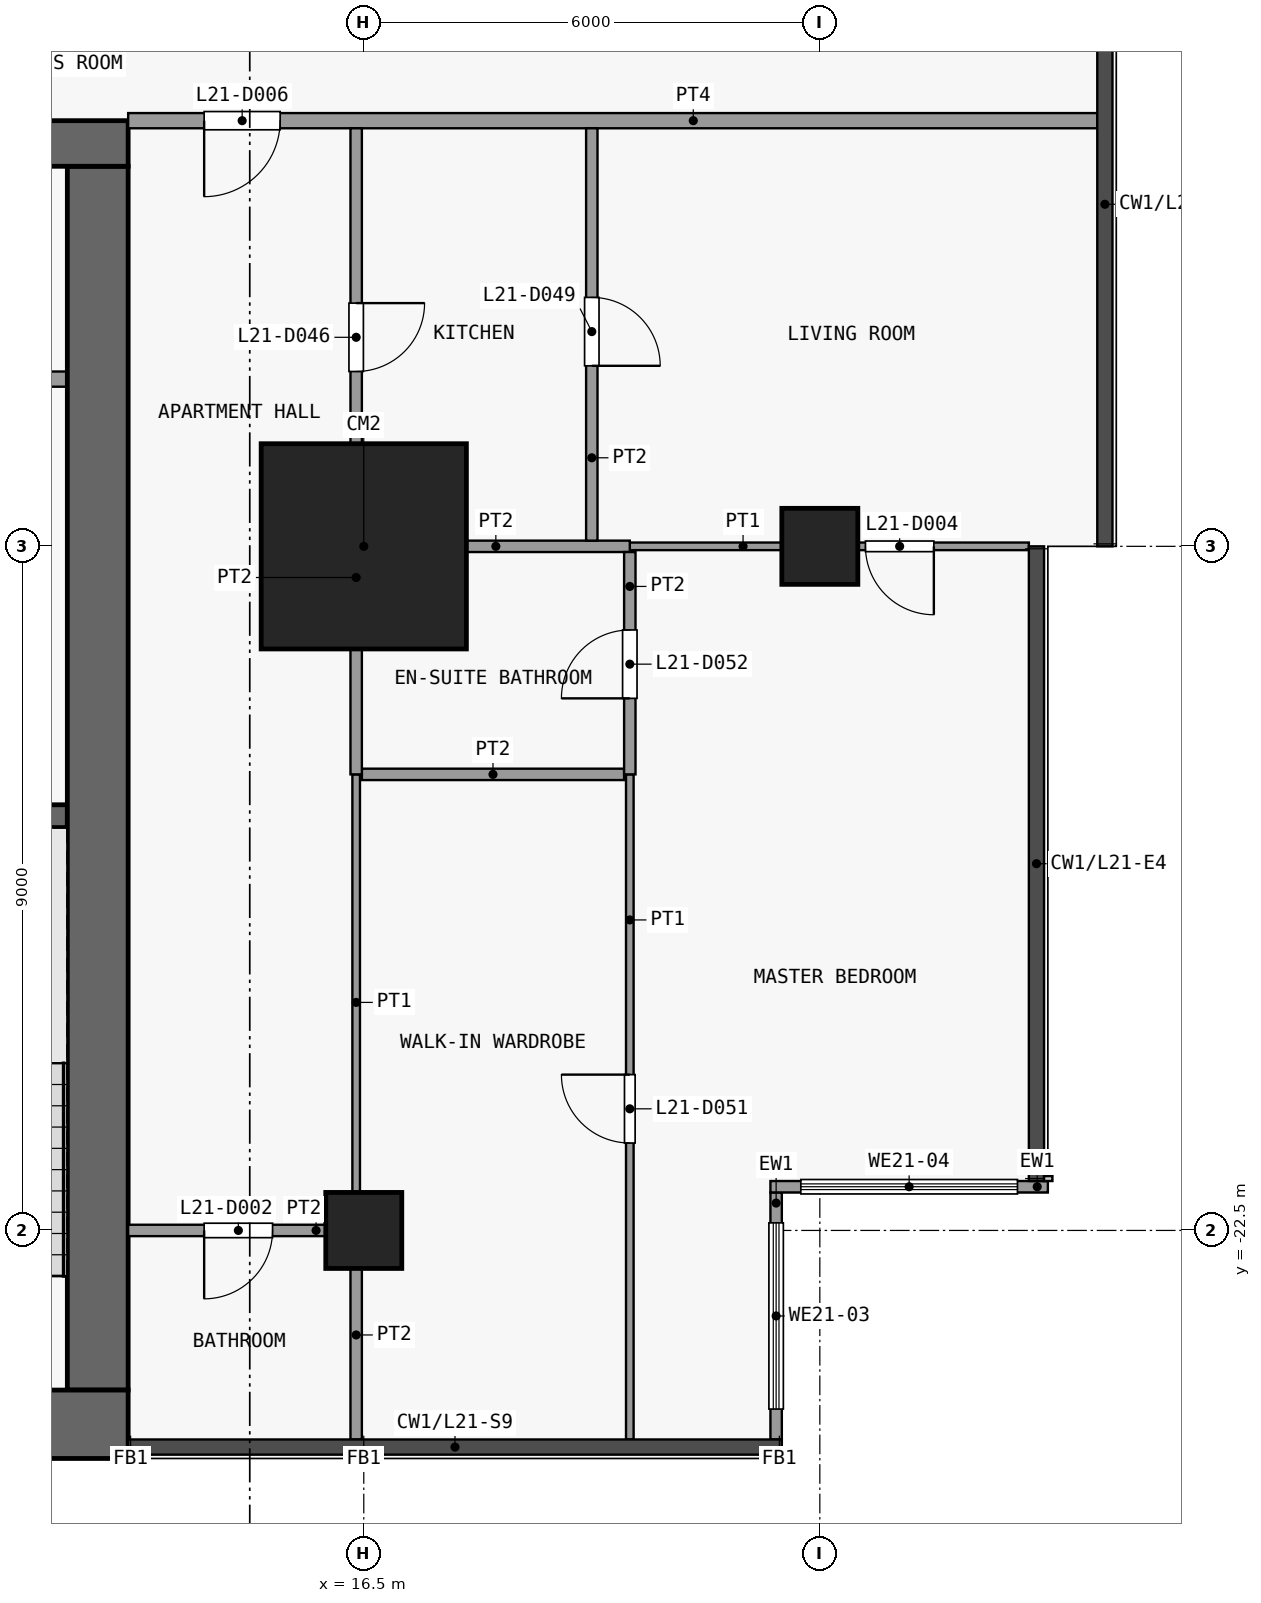
"""IFC4 building model, lengths in metres.
Left out: names, types, materials, properties, quantities, classifications, styles, units other than length and angle.
Written with IfcOpenShell. Run it as: python <this file> out.ifc"""

import sys

from ifc_helpers import new_model, si_unit, direction, frame, frame_2d, origin, origin_2d, place, context, subcontext, project, spatial, rectangle, extrude, element, fill, save


model = new_model("IFC4")
c1 = context("Model", 3, precision=1e-05, world=origin(), true_north=direction((0.0, 1.0)))
c2 = subcontext(c1, "Body", "Model", "MODEL_VIEW")
j1 = project(units=[si_unit("LENGTHUNIT", "METRE"), si_unit("PLANEANGLEUNIT", "RADIAN")], contexts=[c1])
p1 = place(None, origin())
s1 = spatial("IfcSite", under=j1, at=p1, CompositionType="ELEMENT")
p2 = place(p1, origin())
s2 = spatial("IfcBuilding", under=s1, at=p2, CompositionType="ELEMENT")
p3 = place(p2, frame((0.0, 0.0, 88.3)))
s3 = spatial("IfcBuildingStorey", under=s2, at=p3, CompositionType="ELEMENT", Elevation=88.3)
p4 = place(p3, frame((16.5, -22.5, 0.0), z_axis=(0.0, 0.0, 1.0), x_axis=(1.0, 0.0, 0.0)))
e1 = element("IfcColumn", 1, at=p4, inside=s3, PredefinedType="COLUMN", context=c2, shape_type="SweptSolid", body=[
    extrude(rectangle(XDim=1.0, YDim=1.0, at=origin_2d()), origin(), (0.0, 0.0, 1.0), 3.6),
])
p5 = place(p3, frame((16.5, -13.5, 0.0), z_axis=(0.0, 0.0, 1.0), x_axis=(1.0, 0.0, 0.0)))
e2 = element("IfcColumn", 2, at=p5, inside=s3, PredefinedType="COLUMN", context=c2, shape_type="SweptSolid", body=[
    extrude(rectangle(XDim=2.7, YDim=2.7, at=origin_2d()), origin(), (0.0, 0.0, 1.0), 3.6),
])
p6 = place(p3, frame((22.5, -13.5, 0.0), z_axis=(0.0, 0.0, 1.0), x_axis=(1.0, 0.0, 0.0)))
e3 = element("IfcColumn", 3, at=p6, inside=s3, PredefinedType="COLUMN", context=c2, shape_type="SweptSolid", body=[
    extrude(rectangle(XDim=1.0, YDim=1.0, at=origin_2d()), origin(), (0.0, 0.0, 1.0), 3.6),
])
p7 = place(p3, frame((-13.4, -25.05, 0.0), z_axis=(0.0, 0.0, 1.0), x_axis=(1.0, 0.0, 0.0)))
e4 = element("IfcWall", 4, at=p7, inside=s3, PredefinedType="SHEAR", context=c2, shape_type="SweptSolid", body=[
    extrude(rectangle(XDim=26.8, YDim=0.9, at=frame_2d((13.4, 0.0))), origin(), (0.0, 0.0, 1.0), 3.3),
])
p8 = place(p3, frame((-13.4, -8.2, 0.0), z_axis=(0.0, 0.0, 1.0), x_axis=(1.0, 0.0, 0.0)))
e5 = element("IfcWall", 5, at=p8, inside=s3, PredefinedType="SHEAR", context=c2, shape_type="SweptSolid", body=[
    extrude(rectangle(XDim=26.8, YDim=0.6, at=frame_2d((13.4, 0.0))), origin(), (0.0, 0.0, 1.0), 3.3),
])
p9 = place(p8, frame((7.7, 0.0, 0.0)))
e6 = element("IfcOpeningElement", 6, at=p9, cuts=e5, PredefinedType="OPENING", context=c2, shape_type="SweptSolid", body=[
    extrude(rectangle(XDim=1.8, YDim=2.1, at=frame_2d((0.9, 1.05))), frame((0.0, 0.31, 0.0), z_axis=(0.0, -1.0, 0.0), x_axis=(1.0, 0.0, 0.0)), (0.0, 0.0, 1.0), 0.62),
])
p10 = place(p8, frame((17.3, 0.0, 0.0)))
e7 = element("IfcOpeningElement", 7, at=p10, cuts=e5, PredefinedType="OPENING", context=c2, shape_type="SweptSolid", body=[
    extrude(rectangle(XDim=1.8, YDim=2.1, at=frame_2d((0.9, 1.05))), frame((0.0, 0.31, 0.0), z_axis=(0.0, -1.0, 0.0), x_axis=(1.0, 0.0, 0.0)), (0.0, 0.0, 1.0), 0.62),
])
p11 = place(p8, frame((2.625, 0.0, 0.0)))
e8 = element("IfcOpeningElement", 8, at=p11, cuts=e5, PredefinedType="OPENING", context=c2, shape_type="SweptSolid", body=[
    extrude(rectangle(XDim=0.9, YDim=2.1, at=frame_2d((0.45, 1.05))), frame((0.0, 0.31, 0.0), z_axis=(0.0, -1.0, 0.0), x_axis=(1.0, 0.0, 0.0)), (0.0, 0.0, 1.0), 0.62),
])
p12 = place(p8, frame((23.275, 0.0, 0.0)))
e9 = element("IfcOpeningElement", 9, at=p12, cuts=e5, PredefinedType="OPENING", context=c2, shape_type="SweptSolid", body=[
    extrude(rectangle(XDim=0.9, YDim=2.1, at=frame_2d((0.45, 1.05))), frame((0.0, 0.31, 0.0), z_axis=(0.0, -1.0, 0.0), x_axis=(1.0, 0.0, 0.0)), (0.0, 0.0, 1.0), 0.62),
])
p13 = place(p3, frame((13.0, -24.6, 0.0), z_axis=(0.0, 0.0, 1.0), x_axis=(0.0, 1.0, 0.0)))
e10 = element("IfcWall", 10, at=p13, inside=s3, PredefinedType="SHEAR", context=c2, shape_type="SweptSolid", body=[
    extrude(rectangle(XDim=16.1, YDim=0.8, at=frame_2d((8.05, 0.0))), origin(), (0.0, 0.0, 1.0), 3.3),
])
p14 = place(p3, frame((9.5, -17.05, 0.0), z_axis=(0.0, 0.0, 1.0), x_axis=(1.0, 0.0, 0.0)))
e11 = element("IfcWall", 11, at=p14, inside=s3, PredefinedType="SHEAR", context=c2, shape_type="SweptSolid", body=[
    extrude(rectangle(XDim=3.1, YDim=0.3, at=frame_2d((1.55, 0.0))), origin(), (0.0, 0.0, 1.0), 3.3),
])
p15 = place(p3, frame((11.15, -11.3, 0.0), z_axis=(0.0, 0.0, 1.0), x_axis=(1.0, 0.0, 0.0)))
e12 = element("IfcWall", 12, at=p15, inside=s3, PredefinedType="PARTITIONING", context=c2, shape_type="SweptSolid", body=[
    extrude(rectangle(XDim=1.45, YDim=0.2, at=frame_2d((0.725, 0.0))), origin(), (0.0, 0.0, 1.0), 3.3),
])
p16 = place(p3, frame((21.925, -22.0, 0.0), z_axis=(0.0, 0.0, 1.0), x_axis=(0.0, -1.0, 0.0)))
e13 = element("IfcWall", 13, at=p16, inside=s3, PredefinedType="SOLIDWALL", context=c2, shape_type="SweptSolid", body=[
    extrude(rectangle(XDim=3.25, YDim=0.15, at=frame_2d((1.625, 0.0))), origin(), (0.0, 0.0, 1.0), 3.3),
])
p17 = place(p16, frame((0.4, 0.0, 0.9)))
e14 = element("IfcOpeningElement", 14, at=p17, cuts=e13, PredefinedType="OPENING", context=c2, shape_type="SweptSolid", body=[
    extrude(rectangle(XDim=2.45, YDim=2.4, at=frame_2d((1.225, 1.2))), frame((0.0, 0.085, 0.0), z_axis=(0.0, -1.0, 0.0), x_axis=(1.0, 0.0, 0.0)), (0.0, 0.0, 1.0), 0.17),
])
p18 = place(p3, frame((25.5, -21.925, 0.0), z_axis=(0.0, 0.0, 1.0), x_axis=(-1.0, 0.0, 0.0)))
e15 = element("IfcWall", 15, at=p18, inside=s3, PredefinedType="SOLIDWALL", context=c2, shape_type="SweptSolid", body=[
    extrude(rectangle(XDim=3.65, YDim=0.15, at=frame_2d((1.825, 0.0))), origin(), (0.0, 0.0, 1.0), 3.3),
])
p19 = place(p18, frame((0.4, 0.0, 0.9)))
e16 = element("IfcOpeningElement", 16, at=p19, cuts=e15, PredefinedType="OPENING", context=c2, shape_type="SweptSolid", body=[
    extrude(rectangle(XDim=2.85, YDim=2.4, at=frame_2d((1.425, 1.2))), frame((0.0, 0.085, 0.0), z_axis=(0.0, -1.0, 0.0), x_axis=(1.0, 0.0, 0.0)), (0.0, 0.0, 1.0), 0.17),
])
p20 = place(p3, frame((13.4, -22.5, 0.0), z_axis=(0.0, 0.0, 1.0), x_axis=(1.0, 0.0, 0.0)))
e17 = element("IfcWall", 17, at=p20, inside=s3, PredefinedType="PARTITIONING", context=c2, shape_type="SweptSolid", body=[
    extrude(rectangle(XDim=2.925, YDim=0.15, at=frame_2d((1.462, 0.0))), origin(), (0.0, 0.0, 1.0), 3.3),
])
p21 = place(p20, frame((1.0, 0.0, 0.0)))
e18 = element("IfcOpeningElement", 18, at=p21, cuts=e17, PredefinedType="OPENING", context=c2, shape_type="SweptSolid", body=[
    extrude(rectangle(XDim=0.9, YDim=2.1, at=frame_2d((0.45, 1.05))), frame((0.0, 0.085, 0.0), z_axis=(0.0, -1.0, 0.0), x_axis=(1.0, 0.0, 0.0)), (0.0, 0.0, 1.0), 0.17),
])
p22 = place(p3, frame((16.475, -16.5, 0.0), z_axis=(0.0, 0.0, 1.0), x_axis=(1.0, 0.0, 0.0)))
e19 = element("IfcWall", 19, at=p22, inside=s3, PredefinedType="PARTITIONING", context=c2, shape_type="SweptSolid", body=[
    extrude(rectangle(XDim=3.45, YDim=0.15, at=frame_2d((1.725, 0.0))), origin(), (0.0, 0.0, 1.0), 3.3),
])
p23 = place(p3, frame((20.0, -13.5, 0.0), z_axis=(0.0, 0.0, 1.0), x_axis=(1.0, 0.0, 0.0)))
e20 = element("IfcWall", 20, at=p23, inside=s3, PredefinedType="PARTITIONING", context=c2, shape_type="SweptSolid", body=[
    extrude(rectangle(XDim=5.25, YDim=0.1, at=frame_2d((2.625, 0.0))), origin(), (0.0, 0.0, 1.0), 3.3),
])
p24 = place(p23, frame((3.1, 0.0, 0.0)))
e21 = element("IfcOpeningElement", 21, at=p24, cuts=e20, PredefinedType="OPENING", context=c2, shape_type="SweptSolid", body=[
    extrude(rectangle(XDim=0.9, YDim=2.1, at=frame_2d((0.45, 1.05))), frame((0.0, 0.06, 0.0), z_axis=(0.0, -1.0, 0.0), x_axis=(1.0, 0.0, 0.0)), (0.0, 0.0, 1.0), 0.12),
])
p25 = place(p3, frame((16.475, -13.5, 0.0), z_axis=(0.0, 0.0, 1.0), x_axis=(1.0, 0.0, 0.0)))
e22 = element("IfcWall", 22, at=p25, inside=s3, PredefinedType="PARTITIONING", context=c2, shape_type="SweptSolid", body=[
    extrude(rectangle(XDim=3.525, YDim=0.15, at=frame_2d((1.762, 0.0))), origin(), (0.0, 0.0, 1.0), 3.3),
])
p26 = place(p3, frame((13.4, -7.9, 0.0), z_axis=(0.0, 0.0, 1.0), x_axis=(1.0, 0.0, 0.0)))
e23 = element("IfcWall", 23, at=p26, inside=s3, PredefinedType="PARTITIONING", context=c2, shape_type="SweptSolid", body=[
    extrude(rectangle(XDim=12.75, YDim=0.2, at=frame_2d((6.375, 0.0))), origin(), (0.0, 0.0, 1.0), 3.3),
])
p27 = place(p26, frame((1.0, 0.0, 0.0)))
e24 = element("IfcOpeningElement", 24, at=p27, cuts=e23, PredefinedType="OPENING", context=c2, shape_type="SweptSolid", body=[
    extrude(rectangle(XDim=1.0, YDim=2.1, at=frame_2d((0.5, 1.05))), frame((0.0, 0.11, 0.0), z_axis=(0.0, -1.0, 0.0), x_axis=(1.0, 0.0, 0.0)), (0.0, 0.0, 1.0), 0.22),
])
p28 = place(p3, frame((16.4, -22.5, 0.0), z_axis=(0.0, 0.0, 1.0), x_axis=(0.0, 1.0, 0.0)))
e25 = element("IfcWall", 25, at=p28, inside=s3, PredefinedType="PARTITIONING", context=c2, shape_type="SweptSolid", body=[
    extrude(rectangle(XDim=6.0, YDim=0.1, at=frame_2d((3.0, 0.0))), origin(), (0.0, 0.0, 1.0), 3.3),
])
p29 = place(p3, frame((16.4, -25.25, 0.0), z_axis=(0.0, 0.0, 1.0), x_axis=(0.0, 1.0, 0.0)))
e26 = element("IfcWall", 26, at=p29, inside=s3, PredefinedType="PARTITIONING", context=c2, shape_type="SweptSolid", body=[
    extrude(rectangle(XDim=2.75, YDim=0.15, at=frame_2d((1.375, 0.0))), origin(), (0.0, 0.0, 1.0), 3.3),
])
p30 = place(p3, frame((16.4, -16.5, 0.0), z_axis=(0.0, 0.0, 1.0), x_axis=(0.0, 1.0, 0.0)))
e27 = element("IfcWall", 27, at=p30, inside=s3, PredefinedType="PARTITIONING", context=c2, shape_type="SweptSolid", body=[
    extrude(rectangle(XDim=8.5, YDim=0.15, at=frame_2d((4.25, 0.0))), origin(), (0.0, 0.0, 1.0), 3.3),
])
p31 = place(p30, frame((5.3, 0.0, 0.0)))
e28 = element("IfcOpeningElement", 28, at=p31, cuts=e27, PredefinedType="OPENING", context=c2, shape_type="SweptSolid", body=[
    extrude(rectangle(XDim=0.9, YDim=2.1, at=frame_2d((0.45, 1.05))), frame((0.0, 0.085, 0.0), z_axis=(0.0, -1.0, 0.0), x_axis=(1.0, 0.0, 0.0)), (0.0, 0.0, 1.0), 0.17),
])
p32 = place(p3, frame((19.5, -13.425, 0.0), z_axis=(0.0, 0.0, 1.0), x_axis=(0.0, 1.0, 0.0)))
e29 = element("IfcWall", 29, at=p32, inside=s3, PredefinedType="PARTITIONING", context=c2, shape_type="SweptSolid", body=[
    extrude(rectangle(XDim=5.425, YDim=0.15, at=frame_2d((2.712, 0.0))), origin(), (0.0, 0.0, 1.0), 3.3),
])
p33 = place(p32, frame((2.3, 0.0, 0.0)))
e30 = element("IfcOpeningElement", 30, at=p33, cuts=e29, PredefinedType="OPENING", context=c2, shape_type="SweptSolid", body=[
    extrude(rectangle(XDim=0.9, YDim=2.1, at=frame_2d((0.45, 1.05))), frame((0.0, 0.085, 0.0), z_axis=(0.0, -1.0, 0.0), x_axis=(1.0, 0.0, 0.0)), (0.0, 0.0, 1.0), 0.17),
])
p34 = place(p3, frame((20.0, -25.25, 0.0), z_axis=(0.0, 0.0, 1.0), x_axis=(0.0, 1.0, 0.0)))
e31 = element("IfcWall", 31, at=p34, inside=s3, PredefinedType="PARTITIONING", context=c2, shape_type="SweptSolid", body=[
    extrude(rectangle(XDim=8.75, YDim=0.1, at=frame_2d((4.375, 0.0))), origin(), (0.0, 0.0, 1.0), 3.3),
])
p35 = place(p34, frame((3.9, 0.0, 0.0)))
e32 = element("IfcOpeningElement", 32, at=p35, cuts=e31, PredefinedType="OPENING", context=c2, shape_type="SweptSolid", body=[
    extrude(rectangle(XDim=0.9, YDim=2.1, at=frame_2d((0.45, 1.05))), frame((0.0, 0.06, 0.0), z_axis=(0.0, -1.0, 0.0), x_axis=(1.0, 0.0, 0.0)), (0.0, 0.0, 1.0), 0.12),
])
p36 = place(p3, frame((20.0, -16.5, 0.0), z_axis=(0.0, 0.0, 1.0), x_axis=(0.0, 1.0, 0.0)))
e33 = element("IfcWall", 33, at=p36, inside=s3, PredefinedType="PARTITIONING", context=c2, shape_type="SweptSolid", body=[
    extrude(rectangle(XDim=2.925, YDim=0.15, at=frame_2d((1.462, 0.0))), origin(), (0.0, 0.0, 1.0), 3.3),
])
p37 = place(p36, frame((1.0, 0.0, 0.0)))
e34 = element("IfcOpeningElement", 34, at=p37, cuts=e33, PredefinedType="OPENING", context=c2, shape_type="SweptSolid", body=[
    extrude(rectangle(XDim=0.9, YDim=2.1, at=frame_2d((0.45, 1.05))), frame((0.0, 0.085, 0.0), z_axis=(0.0, -1.0, 0.0), x_axis=(1.0, 0.0, 0.0)), (0.0, 0.0, 1.0), 0.17),
])
p38 = place(p17, origin())
e35 = element("IfcWindow", 35, at=p38, inside=s3, PartitioningType="SINGLE_PANEL", PredefinedType="WINDOW", context=c2, shape_type="SweptSolid", body=[
    extrude(rectangle(XDim=2.45, YDim=2.4, at=frame_2d((1.225, 1.2))), frame((0.0, 0.03, 0.0), z_axis=(0.0, -1.0, 0.0), x_axis=(1.0, 0.0, 0.0)), (0.0, 0.0, 1.0), 0.06),
])
fill(e14, e35)
p39 = place(p19, origin())
e36 = element("IfcWindow", 36, at=p39, inside=s3, PartitioningType="SINGLE_PANEL", PredefinedType="WINDOW", context=c2, shape_type="SweptSolid", body=[
    extrude(rectangle(XDim=2.85, YDim=2.4, at=frame_2d((1.425, 1.2))), frame((0.0, 0.03, 0.0), z_axis=(0.0, -1.0, 0.0), x_axis=(1.0, 0.0, 0.0)), (0.0, 0.0, 1.0), 0.06),
])
fill(e16, e36)
p40 = place(p21, origin())
e37 = element("IfcDoor", 37, at=p40, inside=s3, OperationType="SINGLE_SWING_LEFT", PredefinedType="DOOR", context=c2, shape_type="SweptSolid", body=[
    extrude(rectangle(XDim=0.9, YDim=2.1, at=frame_2d((0.45, 1.05))), frame((0.0, 0.025, 0.0), z_axis=(0.0, -1.0, 0.0), x_axis=(1.0, 0.0, 0.0)), (0.0, 0.0, 1.0), 0.05),
])
fill(e18, e37)
p41 = place(p24, origin())
e38 = element("IfcDoor", 38, at=p41, inside=s3, OperationType="SINGLE_SWING_RIGHT", PredefinedType="DOOR", context=c2, shape_type="SweptSolid", body=[
    extrude(rectangle(XDim=0.9, YDim=2.1, at=frame_2d((0.45, 1.05))), frame((0.0, 0.025, 0.0), z_axis=(0.0, -1.0, 0.0), x_axis=(1.0, 0.0, 0.0)), (0.0, 0.0, 1.0), 0.05),
])
fill(e21, e38)
p42 = place(p27, origin())
e39 = element("IfcDoor", 39, at=p42, inside=s3, OperationType="SINGLE_SWING_LEFT", PredefinedType="DOOR", context=c2, shape_type="SweptSolid", body=[
    extrude(rectangle(XDim=1.0, YDim=2.1, at=frame_2d((0.5, 1.05))), frame((0.0, 0.025, 0.0), z_axis=(0.0, -1.0, 0.0), x_axis=(1.0, 0.0, 0.0)), (0.0, 0.0, 1.0), 0.05),
])
fill(e24, e39)
p43 = place(p31, origin())
e40 = element("IfcDoor", 40, at=p43, inside=s3, OperationType="SINGLE_SWING_RIGHT", PredefinedType="DOOR", context=c2, shape_type="SweptSolid", body=[
    extrude(rectangle(XDim=0.9, YDim=2.1, at=frame_2d((0.45, 1.05))), frame((0.0, 0.025, 0.0), z_axis=(0.0, -1.0, 0.0), x_axis=(1.0, 0.0, 0.0)), (0.0, 0.0, 1.0), 0.05),
])
fill(e28, e40)
p44 = place(p33, origin())
e41 = element("IfcDoor", 41, at=p44, inside=s3, OperationType="SINGLE_SWING_LEFT", PredefinedType="DOOR", context=c2, shape_type="SweptSolid", body=[
    extrude(rectangle(XDim=0.9, YDim=2.1, at=frame_2d((0.45, 1.05))), frame((0.0, 0.025, 0.0), z_axis=(0.0, -1.0, 0.0), x_axis=(1.0, 0.0, 0.0)), (0.0, 0.0, 1.0), 0.05),
])
fill(e30, e41)
p45 = place(p35, origin())
e42 = element("IfcDoor", 42, at=p45, inside=s3, OperationType="SINGLE_SWING_LEFT", PredefinedType="DOOR", context=c2, shape_type="SweptSolid", body=[
    extrude(rectangle(XDim=0.9, YDim=2.1, at=frame_2d((0.45, 1.05))), frame((0.0, 0.025, 0.0), z_axis=(0.0, -1.0, 0.0), x_axis=(1.0, 0.0, 0.0)), (0.0, 0.0, 1.0), 0.05),
])
fill(e32, e42)
p46 = place(p37, origin())
e43 = element("IfcDoor", 43, at=p46, inside=s3, OperationType="SINGLE_SWING_RIGHT", PredefinedType="DOOR", context=c2, shape_type="SweptSolid", body=[
    extrude(rectangle(XDim=0.9, YDim=2.1, at=frame_2d((0.45, 1.05))), frame((0.0, 0.025, 0.0), z_axis=(0.0, -1.0, 0.0), x_axis=(1.0, 0.0, 0.0)), (0.0, 0.0, 1.0), 0.05),
])
fill(e34, e43)
save(model, sys.argv[1])
